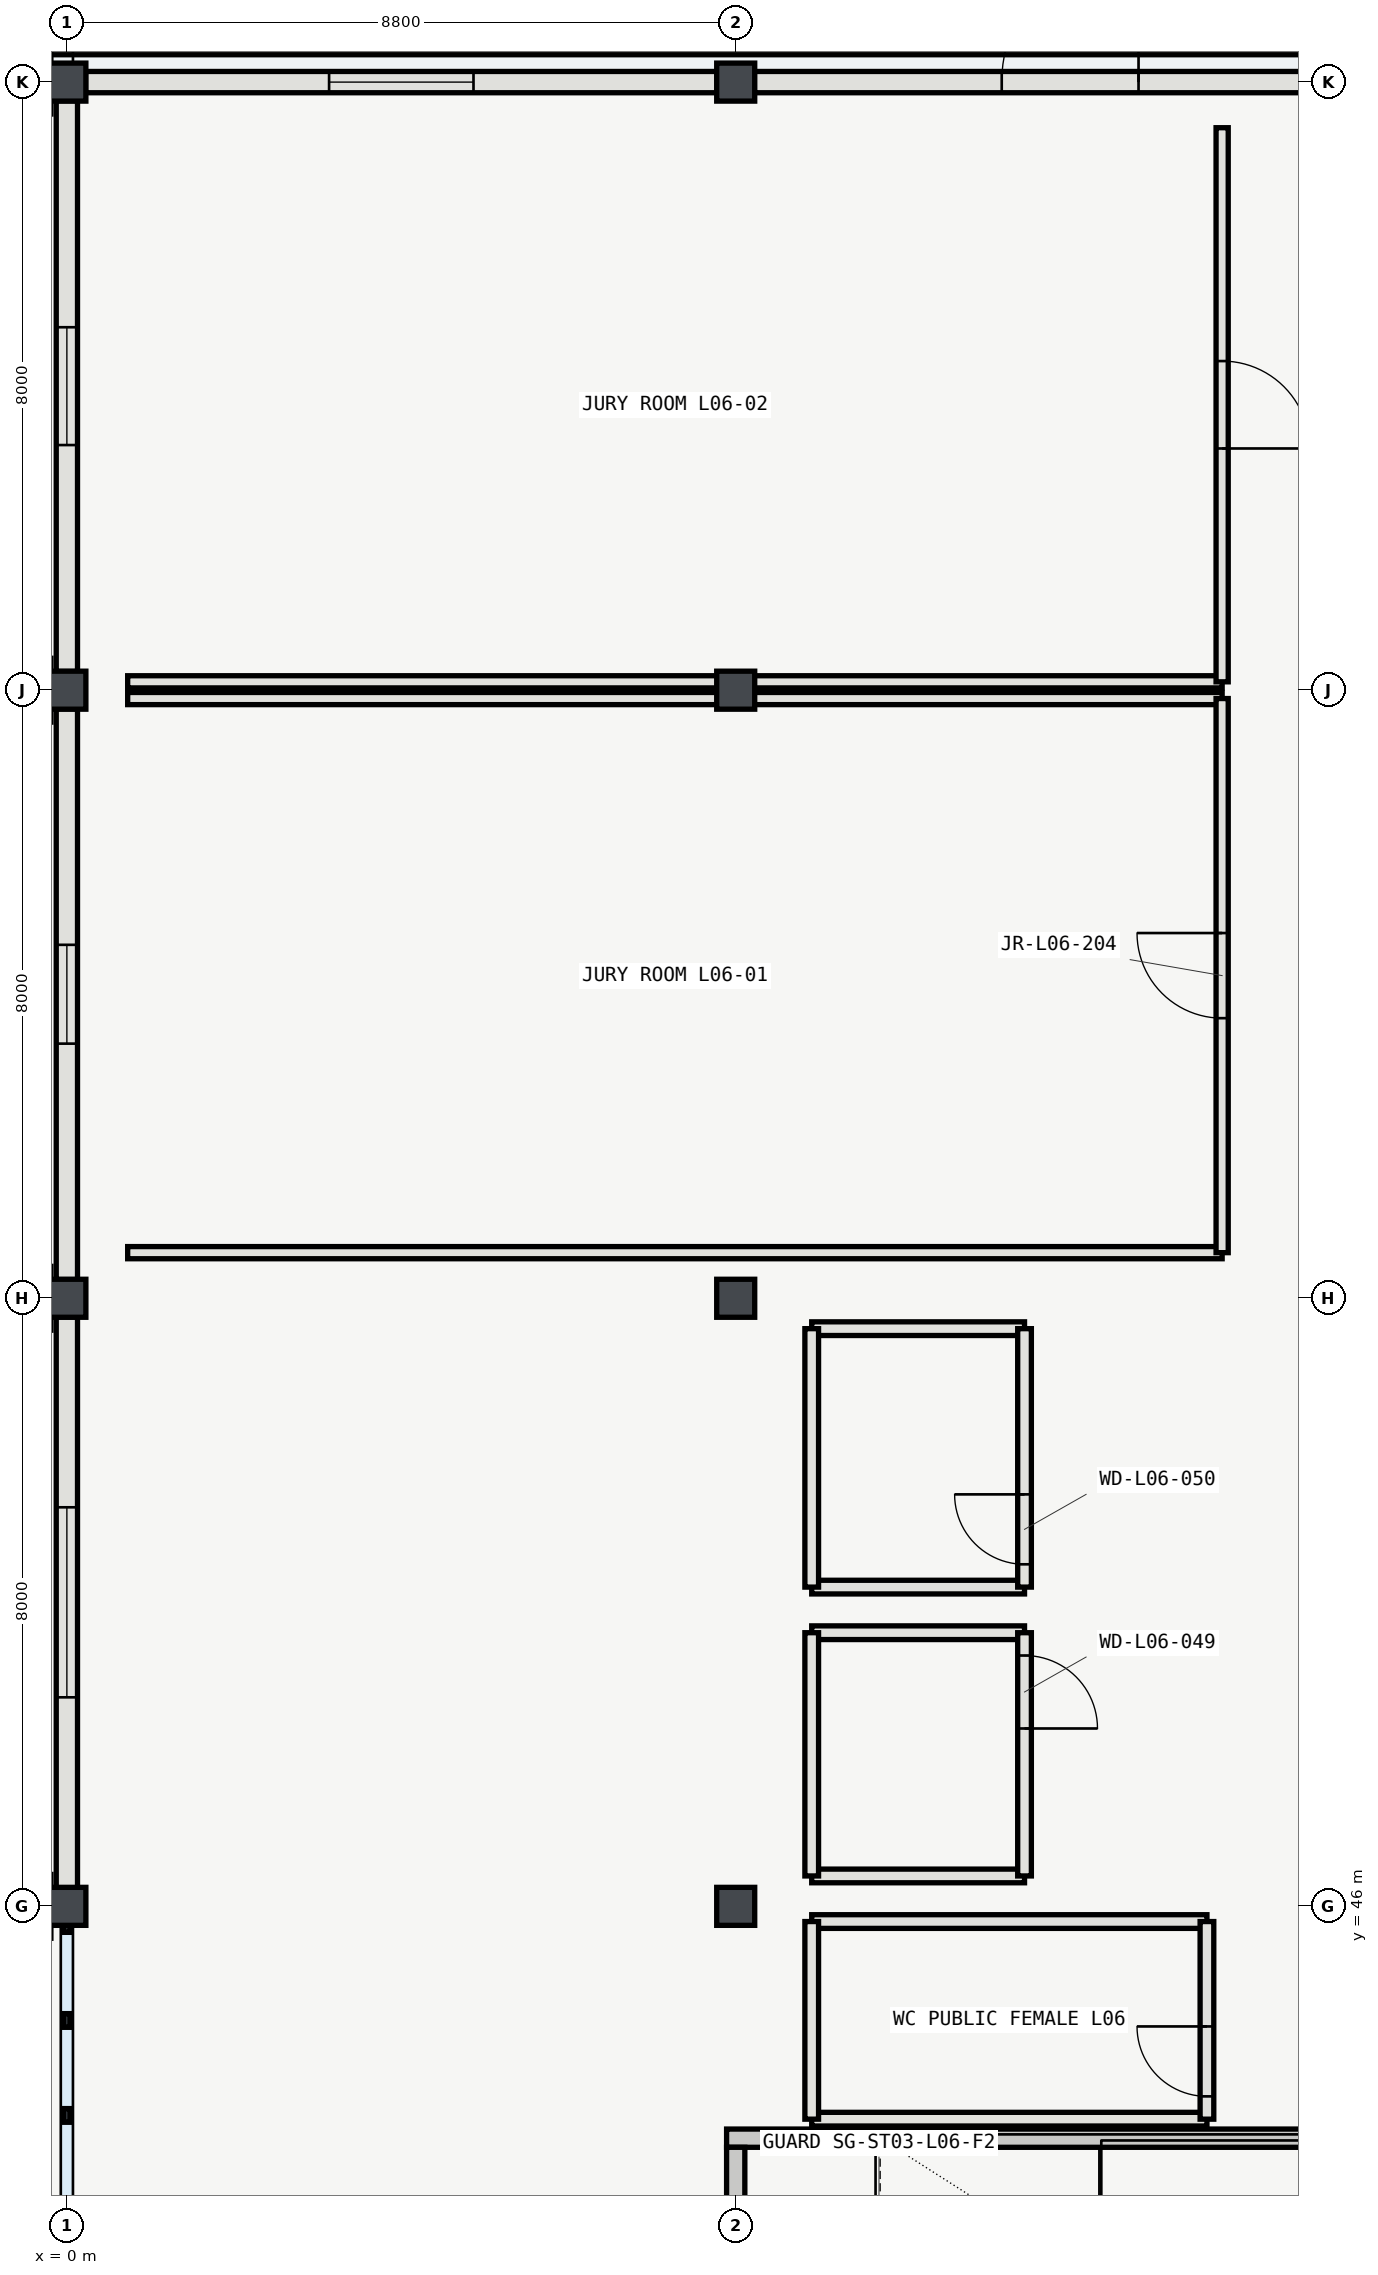
"""IFC4 building model, lengths in metres.
Left out: names, types, materials, properties, quantities, classifications, styles, units other than length and angle.
Written with IfcOpenShell. Run it as: python <this file> out.ifc"""

import sys

from ifc_helpers import new_model, si_unit, direction, frame, frame_2d, origin, origin_2d, place, context, subcontext, project, spatial, rectangle, hollow_rectangle, extrude, element, fill, save


model = new_model("IFC4")
c1 = context("Model", 3, precision=1e-05, world=origin(), true_north=direction((0.0, 1.0)))
c2 = subcontext(c1, "Body", "Model", "MODEL_VIEW")
j1 = project(units=[si_unit("LENGTHUNIT", "METRE"), si_unit("PLANEANGLEUNIT", "RADIAN")], contexts=[c1])
p1 = place(None, origin())
s1 = spatial("IfcSite", under=j1, at=p1, CompositionType="ELEMENT")
p2 = place(p1, origin())
s2 = spatial("IfcBuilding", under=s1, at=p2, CompositionType="ELEMENT")
p3 = place(p2, frame((0.0, 0.0, 28.8)))
s3 = spatial("IfcBuildingStorey", under=s2, at=p3, CompositionType="ELEMENT", Elevation=28.8)
for number, where, z_axis, x_axis in (
    (1, (0.0, 46.0, 0.0), (0.0, 0.0, 1.0), (1.0, 0.0, 0.0)),
    (2, (0.0, 54.0, 0.0), (0.0, 0.0, 1.0), (1.0, 0.0, 0.0)),
    (3, (0.0, 62.0, 0.0), (0.0, 0.0, 1.0), (1.0, 0.0, 0.0)),
    (4, (0.0, 70.0, 0.0), (0.0, 0.0, 1.0), (1.0, 0.0, 0.0)),
    (5, (8.8, 46.0, 0.0), (0.0, 0.0, 1.0), (1.0, 0.0, 0.0)),
    (6, (8.8, 54.0, 0.0), (0.0, 0.0, 1.0), (1.0, 0.0, 0.0)),
    (7, (8.8, 62.0, 0.0), (0.0, 0.0, 1.0), (1.0, 0.0, 0.0)),
    (8, (8.8, 70.0, 0.0), (0.0, 0.0, 1.0), (1.0, 0.0, 0.0)),
):
    element("IfcColumn", number, at=place(p3, frame(where, z_axis=z_axis, x_axis=x_axis)), inside=s3, PredefinedType="COLUMN", context=c2, shape_type="SweptSolid", body=[
        extrude(hollow_rectangle(XDim=0.5, YDim=0.5, WallThickness=0.02, InnerFilletRadius=0.02, OuterFilletRadius=0.04, at=origin_2d()), origin(), (0.0, 0.0, 1.0), 4.2),
    ])
p4 = place(p3, frame((8.554, 70.0, 0.0), z_axis=(0.0, 0.0, 1.0), x_axis=(-1.0, 0.0, 0.0)))
e9 = element("IfcWall", 9, at=p4, inside=s3, PredefinedType="SOLIDWALL", context=c2, shape_type="SweptSolid", body=[
    extrude(rectangle(XDim=8.308, YDim=0.28, at=frame_2d((4.154, 0.0))), origin(), (0.0, 0.0, 1.0), 3.483),
])
p5 = place(p4, frame((3.204, 0.0, 0.95)))
e10 = element("IfcOpeningElement", 10, at=p5, cuts=e9, PredefinedType="OPENING", context=c2, shape_type="SweptSolid", body=[
    extrude(rectangle(XDim=1.9, YDim=1.6, at=frame_2d((0.95, 0.8))), frame((0.0, 0.15, 0.0), z_axis=(0.0, -1.0, 0.0), x_axis=(1.0, 0.0, 0.0)), (0.0, 0.0, 1.0), 0.3),
])
p6 = place(p3, frame((17.304, 70.0, 0.0), z_axis=(0.0, 0.0, 1.0), x_axis=(-1.0, 0.0, 0.0)))
e11 = element("IfcWall", 11, at=p6, inside=s3, PredefinedType="SOLIDWALL", context=c2, shape_type="SweptSolid", body=[
    extrude(rectangle(XDim=8.258, YDim=0.28, at=frame_2d((4.129, 0.0))), origin(), (0.0, 0.0, 1.0), 3.483),
])
p7 = place(p6, frame((3.204, 0.0, 0.0)))
e12 = element("IfcOpeningElement", 12, at=p7, cuts=e11, PredefinedType="OPENING", context=c2, shape_type="SweptSolid", body=[
    extrude(rectangle(XDim=1.8, YDim=2.2, at=frame_2d((0.9, 1.1))), frame((0.0, 0.15, 0.0), z_axis=(0.0, -1.0, 0.0), x_axis=(1.0, 0.0, 0.0)), (0.0, 0.0, 1.0), 0.3),
])
p8 = place(p3, frame((0.0, 53.754, 0.0), z_axis=(0.0, 0.0, 1.0), x_axis=(0.0, -1.0, 0.0)))
e13 = element("IfcWall", 13, at=p8, inside=s3, PredefinedType="SOLIDWALL", context=c2, shape_type="SweptSolid", body=[
    extrude(rectangle(XDim=7.508, YDim=0.28, at=frame_2d((3.754, 0.0))), origin(), (0.0, 0.0, 1.0), 3.483),
])
p9 = place(p8, frame((2.504, 0.0, 0.95)))
e14 = element("IfcOpeningElement", 14, at=p9, cuts=e13, PredefinedType="OPENING", context=c2, shape_type="SweptSolid", body=[
    extrude(rectangle(XDim=2.5, YDim=1.6, at=frame_2d((1.25, 0.8))), frame((0.0, 0.15, 0.0), z_axis=(0.0, -1.0, 0.0), x_axis=(1.0, 0.0, 0.0)), (0.0, 0.0, 1.0), 0.3),
])
p10 = place(p3, frame((0.0, 61.754, 0.0), z_axis=(0.0, 0.0, 1.0), x_axis=(0.0, -1.0, 0.0)))
e15 = element("IfcWall", 15, at=p10, inside=s3, PredefinedType="SOLIDWALL", context=c2, shape_type="SweptSolid", body=[
    extrude(rectangle(XDim=7.508, YDim=0.28, at=frame_2d((3.754, 0.0))), origin(), (0.0, 0.0, 1.0), 3.483),
])
p11 = place(p10, frame((3.104, 0.0, 0.95)))
e16 = element("IfcOpeningElement", 16, at=p11, cuts=e15, PredefinedType="OPENING", context=c2, shape_type="SweptSolid", body=[
    extrude(rectangle(XDim=1.3, YDim=1.95, at=frame_2d((0.65, 0.975))), frame((0.0, 0.15, 0.0), z_axis=(0.0, -1.0, 0.0), x_axis=(1.0, 0.0, 0.0)), (0.0, 0.0, 1.0), 0.3),
])
p12 = place(p3, frame((0.0, 69.754, 0.0), z_axis=(0.0, 0.0, 1.0), x_axis=(0.0, -1.0, 0.0)))
e17 = element("IfcWall", 17, at=p12, inside=s3, PredefinedType="SOLIDWALL", context=c2, shape_type="SweptSolid", body=[
    extrude(rectangle(XDim=7.508, YDim=0.28, at=frame_2d((3.754, 0.0))), origin(), (0.0, 0.0, 1.0), 3.483),
])
p13 = place(p12, frame((2.979, 0.0, 0.95)))
e18 = element("IfcOpeningElement", 18, at=p13, cuts=e17, PredefinedType="OPENING", context=c2, shape_type="SweptSolid", body=[
    extrude(rectangle(XDim=1.55, YDim=1.95, at=frame_2d((0.775, 0.975))), frame((0.0, 0.15, 0.0), z_axis=(0.0, -1.0, 0.0), x_axis=(1.0, 0.0, 0.0)), (0.0, 0.0, 1.0), 0.3),
])
p14 = place(p3, frame((44.34, 70.44, 0.0), z_axis=(0.0, 0.0, 1.0), x_axis=(-1.0, 0.0, 0.0)))
e19 = element("IfcWall", 19, at=p14, inside=s3, PredefinedType="SOLIDWALL", context=c2, shape_type="SweptSolid", body=[
    extrude(rectangle(XDim=44.68, YDim=0.16, at=frame_2d((22.34, 0.0))), origin(), (0.0, 0.0, 1.0), 0.58),
])
for number, where, z_axis, x_axis in (
    (20, (9.8, 46.4, 0.0), (0.0, 0.0, 1.0), (1.0, 0.0, 0.0)),
    (21, (12.6, 49.6, 0.0), (0.0, 0.0, 1.0), (-1.0, 0.0, 0.0)),
):
    element("IfcWall", number, at=place(p3, frame(where, z_axis=z_axis, x_axis=x_axis)), inside=s3, PredefinedType="PLUMBINGWALL", context=c2, shape_type="SweptSolid", body=[
        extrude(rectangle(XDim=2.8, YDim=0.18, at=frame_2d((1.4, 0.0))), origin(), (0.0, 0.0, 1.0), 3.92),
    ])
p15 = place(p3, frame((9.8, 49.6, 0.0), z_axis=(0.0, 0.0, 1.0), x_axis=(0.0, -1.0, 0.0)))
e22 = element("IfcWall", 22, at=p15, inside=s3, PredefinedType="PLUMBINGWALL", context=c2, shape_type="SweptSolid", body=[
    extrude(rectangle(XDim=3.2, YDim=0.18, at=frame_2d((1.6, 0.0))), origin(), (0.0, 0.0, 1.0), 3.92),
])
p16 = place(p3, frame((12.6, 46.4, 0.0), z_axis=(0.0, 0.0, 1.0), x_axis=(0.0, 1.0, 0.0)))
e23 = element("IfcWall", 23, at=p16, inside=s3, PredefinedType="PLUMBINGWALL", context=c2, shape_type="SweptSolid", body=[
    extrude(rectangle(XDim=3.2, YDim=0.18, at=frame_2d((1.6, 0.0))), origin(), (0.0, 0.0, 1.0), 3.92),
])
p17 = place(p16, frame((1.94, 0.0, 0.0)))
e24 = element("IfcOpeningElement", 24, at=p17, cuts=e23, PredefinedType="OPENING", context=c2, shape_type="SweptSolid", body=[
    extrude(rectangle(XDim=0.96, YDim=2.1, at=frame_2d((0.48, 1.05))), frame((0.0, 0.1, 0.0), z_axis=(0.0, -1.0, 0.0), x_axis=(1.0, 0.0, 0.0)), (0.0, 0.0, 1.0), 0.2),
])
for number, where, z_axis, x_axis in (
    (25, (9.8, 50.2, 0.0), (0.0, 0.0, 1.0), (1.0, 0.0, 0.0)),
    (26, (12.6, 53.6, 0.0), (0.0, 0.0, 1.0), (-1.0, 0.0, 0.0)),
):
    element("IfcWall", number, at=place(p3, frame(where, z_axis=z_axis, x_axis=x_axis)), inside=s3, PredefinedType="PLUMBINGWALL", context=c2, shape_type="SweptSolid", body=[
        extrude(rectangle(XDim=2.8, YDim=0.18, at=frame_2d((1.4, 0.0))), origin(), (0.0, 0.0, 1.0), 3.92),
    ])
p18 = place(p3, frame((9.8, 53.6, 0.0), z_axis=(0.0, 0.0, 1.0), x_axis=(0.0, -1.0, 0.0)))
e27 = element("IfcWall", 27, at=p18, inside=s3, PredefinedType="PLUMBINGWALL", context=c2, shape_type="SweptSolid", body=[
    extrude(rectangle(XDim=3.4, YDim=0.18, at=frame_2d((1.7, 0.0))), origin(), (0.0, 0.0, 1.0), 3.92),
])
p19 = place(p3, frame((12.6, 50.2, 0.0), z_axis=(0.0, 0.0, 1.0), x_axis=(0.0, 1.0, 0.0)))
e28 = element("IfcWall", 28, at=p19, inside=s3, PredefinedType="PLUMBINGWALL", context=c2, shape_type="SweptSolid", body=[
    extrude(rectangle(XDim=3.4, YDim=0.18, at=frame_2d((1.7, 0.0))), origin(), (0.0, 0.0, 1.0), 3.92),
])
p20 = place(p19, frame((0.3, 0.0, 0.0)))
e29 = element("IfcOpeningElement", 29, at=p20, cuts=e28, PredefinedType="OPENING", context=c2, shape_type="SweptSolid", body=[
    extrude(rectangle(XDim=0.92, YDim=2.1, at=frame_2d((0.46, 1.05))), frame((0.0, 0.1, 0.0), z_axis=(0.0, -1.0, 0.0), x_axis=(1.0, 0.0, 0.0)), (0.0, 0.0, 1.0), 0.2),
])
p21 = place(p3, frame((9.8, 43.2, 0.0), z_axis=(0.0, 0.0, 1.0), x_axis=(1.0, 0.0, 0.0)))
e30 = element("IfcWall", 30, at=p21, inside=s3, PredefinedType="PLUMBINGWALL", context=c2, shape_type="SweptSolid", body=[
    extrude(rectangle(XDim=5.2, YDim=0.18, at=frame_2d((2.6, 0.0))), origin(), (0.0, 0.0, 1.0), 3.92),
])
p22 = place(p3, frame((15.0, 45.8, 0.0), z_axis=(0.0, 0.0, 1.0), x_axis=(-1.0, 0.0, 0.0)))
e31 = element("IfcWall", 31, at=p22, inside=s3, PredefinedType="PLUMBINGWALL", context=c2, shape_type="SweptSolid", body=[
    extrude(rectangle(XDim=5.2, YDim=0.18, at=frame_2d((2.6, 0.0))), origin(), (0.0, 0.0, 1.0), 3.596),
])
p23 = place(p3, frame((9.8, 45.8, 0.0), z_axis=(0.0, 0.0, 1.0), x_axis=(0.0, -1.0, 0.0)))
e32 = element("IfcWall", 32, at=p23, inside=s3, PredefinedType="PLUMBINGWALL", context=c2, shape_type="SweptSolid", body=[
    extrude(rectangle(XDim=2.6, YDim=0.18, at=frame_2d((1.3, 0.0))), origin(), (0.0, 0.0, 1.0), 3.92),
])
p24 = place(p3, frame((15.0, 43.2, 0.0), z_axis=(0.0, 0.0, 1.0), x_axis=(0.0, 1.0, 0.0)))
e33 = element("IfcWall", 33, at=p24, inside=s3, PredefinedType="PLUMBINGWALL", context=c2, shape_type="SweptSolid", body=[
    extrude(rectangle(XDim=2.6, YDim=0.18, at=frame_2d((1.3, 0.0))), origin(), (0.0, 0.0, 1.0), 3.92),
])
p25 = place(p24, frame((0.3, 0.0, 0.0)))
e34 = element("IfcOpeningElement", 34, at=p25, cuts=e33, PredefinedType="OPENING", context=c2, shape_type="SweptSolid", body=[
    extrude(rectangle(XDim=0.92, YDim=2.1, at=frame_2d((0.46, 1.05))), frame((0.0, 0.1, 0.0), z_axis=(0.0, -1.0, 0.0), x_axis=(1.0, 0.0, 0.0)), (0.0, 0.0, 1.0), 0.2),
])
p26 = place(p3, frame((0.8, 54.6, 0.0), z_axis=(0.0, 0.0, 1.0), x_axis=(1.0, 0.0, 0.0)))
e35 = element("IfcWall", 35, at=p26, inside=s3, PredefinedType="PARTITIONING", context=c2, shape_type="SweptSolid", body=[
    extrude(rectangle(XDim=14.4, YDim=0.16, at=frame_2d((7.2, 0.0))), origin(), (0.0, 0.0, 1.0), 3.92),
])
p27 = place(p3, frame((15.2, 61.89, 0.0), z_axis=(0.0, 0.0, 1.0), x_axis=(-1.0, 0.0, 0.0)))
e36 = element("IfcWall", 36, at=p27, inside=s3, PredefinedType="PARTITIONING", context=c2, shape_type="SweptSolid", body=[
    extrude(rectangle(XDim=14.4, YDim=0.16, at=frame_2d((7.2, 0.0))), origin(), (0.0, 0.0, 1.0), 3.596),
])
p28 = place(p3, frame((15.2, 54.6, 0.0), z_axis=(0.0, 0.0, 1.0), x_axis=(0.0, 1.0, 0.0)))
e37 = element("IfcWall", 37, at=p28, inside=s3, PredefinedType="PARTITIONING", context=c2, shape_type="SweptSolid", body=[
    extrude(rectangle(XDim=7.29, YDim=0.16, at=frame_2d((3.645, 0.0))), origin(), (0.0, 0.0, 1.0), 3.92),
])
p29 = place(p28, frame((3.085, 0.0, 0.0)))
e38 = element("IfcOpeningElement", 38, at=p29, cuts=e37, PredefinedType="OPENING", context=c2, shape_type="SweptSolid", body=[
    extrude(rectangle(XDim=1.12, YDim=2.2, at=frame_2d((0.56, 1.1))), frame((0.0, 0.09, 0.0), z_axis=(0.0, -1.0, 0.0), x_axis=(1.0, 0.0, 0.0)), (0.0, 0.0, 1.0), 0.18),
])
p30 = place(p3, frame((0.8, 62.11, 0.0), z_axis=(0.0, 0.0, 1.0), x_axis=(1.0, 0.0, 0.0)))
e39 = element("IfcWall", 39, at=p30, inside=s3, PredefinedType="PARTITIONING", context=c2, shape_type="SweptSolid", body=[
    extrude(rectangle(XDim=14.4, YDim=0.16, at=frame_2d((7.2, 0.0))), origin(), (0.0, 0.0, 1.0), 3.596),
])
p31 = place(p3, frame((15.2, 62.11, 0.0), z_axis=(0.0, 0.0, 1.0), x_axis=(0.0, 1.0, 0.0)))
e40 = element("IfcWall", 40, at=p31, inside=s3, PredefinedType="PARTITIONING", context=c2, shape_type="SweptSolid", body=[
    extrude(rectangle(XDim=7.29, YDim=0.16, at=frame_2d((3.645, 0.0))), origin(), (0.0, 0.0, 1.0), 3.92),
])
p32 = place(p31, frame((3.07, 0.0, 0.0)))
e41 = element("IfcOpeningElement", 41, at=p32, cuts=e40, PredefinedType="OPENING", context=c2, shape_type="SweptSolid", body=[
    extrude(rectangle(XDim=1.15, YDim=2.2, at=frame_2d((0.575, 1.1))), frame((0.0, 0.09, 0.0), z_axis=(0.0, -1.0, 0.0), x_axis=(1.0, 0.0, 0.0)), (0.0, 0.0, 1.0), 0.18),
])
p33 = place(p3, frame((17.72, 42.95, 0.0), z_axis=(0.0, 0.0, 1.0), x_axis=(-1.0, 0.0, 0.0)))
e42 = element("IfcWall", 42, at=p33, inside=s3, PredefinedType="SHEAR", context=c2, shape_type="SweptSolid", body=[
    extrude(rectangle(XDim=9.04, YDim=0.24, at=frame_2d((4.52, 0.0))), origin(), (0.0, 0.0, 1.0), 3.95),
])
p34 = place(p3, frame((8.8, 38.67, 0.0), z_axis=(0.0, 0.0, 1.0), x_axis=(0.0, 1.0, 0.0)))
e43 = element("IfcWall", 43, at=p34, inside=s3, PredefinedType="SHEAR", context=c2, shape_type="SweptSolid", body=[
    extrude(rectangle(XDim=4.16, YDim=0.24, at=frame_2d((2.08, 0.0))), origin(), (0.0, 0.0, 1.0), 3.95),
])
p35 = place(p34, frame((1.38, 0.0, 0.0)))
e44 = element("IfcOpeningElement", 44, at=p35, cuts=e43, PredefinedType="OPENING", context=c2, shape_type="SweptSolid", body=[
    extrude(rectangle(XDim=1.4, YDim=2.2, at=frame_2d((0.7, 1.1))), frame((0.0, 0.13, 0.0), z_axis=(0.0, -1.0, 0.0), x_axis=(1.0, 0.0, 0.0)), (0.0, 0.0, 1.0), 0.26),
])
p36 = place(p5, origin())
e45 = element("IfcWindow", 45, at=p36, inside=s3, PartitioningType="SINGLE_PANEL", PredefinedType="WINDOW", context=c2, shape_type="SweptSolid", body=[
    extrude(rectangle(XDim=1.9, YDim=1.6, at=frame_2d((0.95, 0.8))), frame((0.0, 0.03, 0.0), z_axis=(0.0, -1.0, 0.0), x_axis=(1.0, 0.0, 0.0)), (0.0, 0.0, 1.0), 0.06),
])
fill(e10, e45)
p37 = place(p7, origin())
e46 = element("IfcDoor", 46, at=p37, inside=s3, OperationType="DOUBLE_DOOR_SINGLE_SWING", PredefinedType="DOOR", context=c2, shape_type="SweptSolid", body=[
    extrude(rectangle(XDim=1.8, YDim=2.2, at=frame_2d((0.9, 1.1))), frame((0.0, 0.025, 0.0), z_axis=(0.0, -1.0, 0.0), x_axis=(1.0, 0.0, 0.0)), (0.0, 0.0, 1.0), 0.05),
])
fill(e12, e46)
p38 = place(p9, origin())
e47 = element("IfcWindow", 47, at=p38, inside=s3, PartitioningType="SINGLE_PANEL", PredefinedType="WINDOW", context=c2, shape_type="SweptSolid", body=[
    extrude(rectangle(XDim=2.5, YDim=1.6, at=frame_2d((1.25, 0.8))), frame((0.0, 0.03, 0.0), z_axis=(0.0, -1.0, 0.0), x_axis=(1.0, 0.0, 0.0)), (0.0, 0.0, 1.0), 0.06),
])
fill(e14, e47)
p39 = place(p11, origin())
e48 = element("IfcWindow", 48, at=p39, inside=s3, PartitioningType="SINGLE_PANEL", PredefinedType="WINDOW", context=c2, shape_type="SweptSolid", body=[
    extrude(rectangle(XDim=1.3, YDim=1.95, at=frame_2d((0.65, 0.975))), frame((0.0, 0.03, 0.0), z_axis=(0.0, -1.0, 0.0), x_axis=(1.0, 0.0, 0.0)), (0.0, 0.0, 1.0), 0.06),
])
fill(e16, e48)
p40 = place(p13, origin())
e49 = element("IfcWindow", 49, at=p40, inside=s3, PartitioningType="SINGLE_PANEL", PredefinedType="WINDOW", context=c2, shape_type="SweptSolid", body=[
    extrude(rectangle(XDim=1.55, YDim=1.95, at=frame_2d((0.775, 0.975))), frame((0.0, 0.03, 0.0), z_axis=(0.0, -1.0, 0.0), x_axis=(1.0, 0.0, 0.0)), (0.0, 0.0, 1.0), 0.06),
])
fill(e18, e49)
p41 = place(p17, origin())
e50 = element("IfcDoor", 50, at=p41, inside=s3, OperationType="SINGLE_SWING_LEFT", PredefinedType="DOOR", context=c2, shape_type="SweptSolid", body=[
    extrude(rectangle(XDim=0.96, YDim=2.1, at=frame_2d((0.48, 1.05))), frame((0.0, 0.025, 0.0), z_axis=(0.0, -1.0, 0.0), x_axis=(1.0, 0.0, 0.0)), (0.0, 0.0, 1.0), 0.05),
])
fill(e24, e50)
p42 = place(p20, origin())
e51 = element("IfcDoor", 51, at=p42, inside=s3, OperationType="SINGLE_SWING_RIGHT", PredefinedType="DOOR", context=c2, shape_type="SweptSolid", body=[
    extrude(rectangle(XDim=0.92, YDim=2.1, at=frame_2d((0.46, 1.05))), frame((0.0, 0.025, 0.0), z_axis=(0.0, -1.0, 0.0), x_axis=(1.0, 0.0, 0.0)), (0.0, 0.0, 1.0), 0.05),
])
fill(e29, e51)
p43 = place(p25, origin())
e52 = element("IfcDoor", 52, at=p43, inside=s3, OperationType="SINGLE_SWING_RIGHT", PredefinedType="DOOR", context=c2, shape_type="SweptSolid", body=[
    extrude(rectangle(XDim=0.92, YDim=2.1, at=frame_2d((0.46, 1.05))), frame((0.0, 0.025, 0.0), z_axis=(0.0, -1.0, 0.0), x_axis=(1.0, 0.0, 0.0)), (0.0, 0.0, 1.0), 0.05),
])
fill(e34, e52)
p44 = place(p29, origin())
e53 = element("IfcDoor", 53, at=p44, inside=s3, OperationType="SINGLE_SWING_RIGHT", PredefinedType="DOOR", context=c2, shape_type="SweptSolid", body=[
    extrude(rectangle(XDim=1.12, YDim=2.2, at=frame_2d((0.56, 1.1))), frame((0.0, 0.025, 0.0), z_axis=(0.0, -1.0, 0.0), x_axis=(1.0, 0.0, 0.0)), (0.0, 0.0, 1.0), 0.05),
])
fill(e38, e53)
p45 = place(p32, origin())
e54 = element("IfcDoor", 54, at=p45, inside=s3, OperationType="SINGLE_SWING_LEFT", PredefinedType="DOOR", context=c2, shape_type="SweptSolid", body=[
    extrude(rectangle(XDim=1.15, YDim=2.2, at=frame_2d((0.575, 1.1))), frame((0.0, 0.025, 0.0), z_axis=(0.0, -1.0, 0.0), x_axis=(1.0, 0.0, 0.0)), (0.0, 0.0, 1.0), 0.05),
])
fill(e41, e54)
save(model, sys.argv[1])
